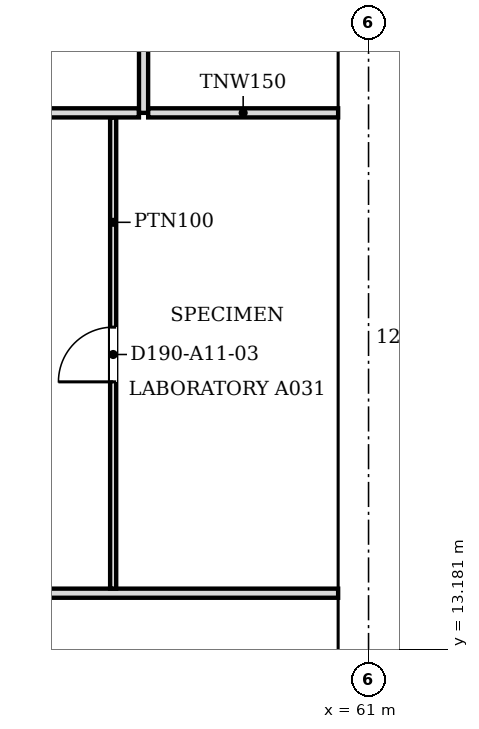
"""IFC4 building model, lengths in metres.
Left out: names, types, materials, properties, quantities, classifications, styles, units other than length and angle.
Written with IfcOpenShell. Run it as: python <this file> out.ifc"""

import sys

from ifc_helpers import new_model, si_unit, direction, frame, frame_2d, origin, place, context, subcontext, project, spatial, polyline, rectangle, outline, extrude, faceted_brep, source, transform, mapped, element, fill, save


model = new_model("IFC4")
c1 = context("Model", 3, precision=1e-05, world=origin(), true_north=direction((0.0, 1.0)))
c2 = subcontext(c1, "Body", "Model", "MODEL_VIEW")
j1 = project(units=[si_unit("LENGTHUNIT", "METRE"), si_unit("PLANEANGLEUNIT", "RADIAN")], contexts=[c1])
p1 = place(None, origin())
s1 = spatial("IfcSite", under=j1, at=p1, CompositionType="ELEMENT")
p2 = place(p1, origin())
s2 = spatial("IfcBuilding", under=s1, at=p2, CompositionType="ELEMENT")
p3 = place(p2, frame((0.0, 0.0, 131.6)))
s3 = spatial("IfcBuildingStorey", under=s2, at=p3, CompositionType="ELEMENT", Elevation=131.6)
m1 = source(origin(), c2, "Body", "SweptSolid", [
    extrude(outline(polyline([(3.05, 0.0), (6.1, 3.8), (3.05, 7.6), (0.0, 3.8), (3.05, 0.0)])), frame((0.0, 0.25, 0.0), z_axis=(0.0, -1.0, 0.0), x_axis=(1.0, 0.0, 0.0)), (0.0, 0.0, 1.0), 0.5),
])
p4 = place(p3, frame((60.75, 9.15, -3.8), z_axis=(0.0, 0.0, 1.0), x_axis=(0.0, 1.0, 0.0)))
e1 = element("IfcWall", 1, at=p4, inside=s3, PredefinedType="SOLIDWALL", context=c2, shape_type="MappedRepresentation", body=[
    mapped(m1, transform((0.0, 0.0, 0.0), scale=1.0)),
])
m2 = source(origin(), c2, "Body", "SweptSolid", [
    extrude(outline(polyline([(3.05, 0.399), (5.78, 3.8), (3.05, 7.2), (0.321, 3.8), (3.05, 0.399)])), frame((0.0, 0.26, 0.0), z_axis=(0.0, -1.0, 0.0), x_axis=(1.0, 0.0, 0.0)), (0.0, 0.0, 1.0), 0.52),
])
p5 = place(p4, origin())
e2 = element("IfcOpeningElement", 2, at=p5, cuts=e1, PredefinedType="OPENING", context=c2, shape_type="MappedRepresentation", body=[
    mapped(m2, transform((0.0, 0.0, 0.0), scale=1.0)),
])
p6 = place(p3, frame((60.75, 15.25, -3.8), z_axis=(0.0, 0.0, 1.0), x_axis=(0.0, 1.0, 0.0)))
e3 = element("IfcWall", 3, at=p6, inside=s3, PredefinedType="SOLIDWALL", context=c2, shape_type="MappedRepresentation", body=[
    mapped(m1, transform((0.0, 0.0, 0.0), scale=1.0)),
])
p7 = place(p6, origin())
e4 = element("IfcOpeningElement", 4, at=p7, cuts=e3, PredefinedType="OPENING", context=c2, shape_type="MappedRepresentation", body=[
    mapped(m2, transform((0.0, 0.0, 0.0), scale=1.0)),
])
m3 = source(origin(), c2, "Body", "Brep", [
    faceted_brep([(3.05, -0.25, 0.0), (6.1, -0.25, 3.8), (6.1, -0.25, 3.8), (3.05, -0.25, 7.6), (0.0, -0.25, 3.8), (0.0, 0.25, 3.8), (3.05, 0.25, 7.6), (6.1, 0.25, 3.8), (6.1, 0.25, 3.8), (3.05, 0.25, 0.0)], [[[0, 1, 2, 3, 4]], [[5, 6, 7, 8, 9]], [[9, 8, 1, 0]], [[7, 6, 3, 2]], [[6, 5, 4, 3]], [[5, 9, 0, 4]], [[1, 8, 7, 2]]]),
])
p8 = place(p3, frame((60.75, 21.35, -3.8), z_axis=(0.0, 0.0, 1.0), x_axis=(0.0, 1.0, 0.0)))
e5 = element("IfcWall", 5, at=p8, inside=s3, PredefinedType="SOLIDWALL", context=c2, shape_type="MappedRepresentation", body=[
    mapped(m3, transform((0.0, 0.0, 0.0), scale=1.0)),
])
p9 = place(p8, origin())
e6 = element("IfcOpeningElement", 6, at=p9, cuts=e5, PredefinedType="OPENING", context=c2, shape_type="MappedRepresentation", body=[
    mapped(m2, transform((0.0, 0.0, 0.0), scale=1.0)),
])
p10 = place(p2, frame((0.0, 0.0, 135.4)))
s4 = spatial("IfcBuildingStorey", under=s2, at=p10, CompositionType="ELEMENT", Elevation=135.4)
m4 = source(origin(), c2, "Body", "SweptSolid", [
    extrude(outline(polyline([(3.05, 0.0), (6.1, 3.8), (3.05, 7.6), (0.0, 3.8), (3.05, 0.0)])), frame((0.0, 0.25, 0.0), z_axis=(0.0, -1.0, 0.0), x_axis=(1.0, 0.0, 0.0)), (0.0, 0.0, 1.0), 0.5),
])
p11 = place(p10, frame((60.75, 12.2, -3.8), z_axis=(0.0, 0.0, 1.0), x_axis=(0.0, 1.0, 0.0)))
e7 = element("IfcWall", 7, at=p11, inside=s4, PredefinedType="SOLIDWALL", context=c2, shape_type="MappedRepresentation", body=[
    mapped(m4, transform((0.0, 0.0, 0.0), scale=1.0)),
])
m5 = source(origin(), c2, "Body", "SweptSolid", [
    extrude(outline(polyline([(3.05, 0.399), (5.78, 3.8), (3.05, 7.2), (0.321, 3.8), (3.05, 0.399)])), frame((0.0, 0.26, 0.0), z_axis=(0.0, -1.0, 0.0), x_axis=(1.0, 0.0, 0.0)), (0.0, 0.0, 1.0), 0.52),
])
p12 = place(p11, origin())
e8 = element("IfcOpeningElement", 8, at=p12, cuts=e7, PredefinedType="OPENING", context=c2, shape_type="MappedRepresentation", body=[
    mapped(m5, transform((0.0, 0.0, 0.0), scale=1.0)),
])
m6 = source(origin(), c2, "Body", "Brep", [
    faceted_brep([(3.05, -0.25, 0.0), (6.1, -0.25, 3.8), (6.1, -0.25, 3.8), (3.05, -0.25, 7.6), (0.0, -0.25, 3.8), (0.0, 0.25, 3.8), (3.05, 0.25, 7.6), (6.1, 0.25, 3.8), (6.1, 0.25, 3.8), (3.05, 0.25, 0.0)], [[[0, 1, 2, 3, 4]], [[5, 6, 7, 8, 9]], [[9, 8, 1, 0]], [[7, 6, 3, 2]], [[6, 5, 4, 3]], [[5, 9, 0, 4]], [[1, 8, 7, 2]]]),
])
p13 = place(p10, frame((60.75, 18.3, -3.8), z_axis=(0.0, 0.0, 1.0), x_axis=(0.0, 1.0, 0.0)))
e9 = element("IfcWall", 9, at=p13, inside=s4, PredefinedType="SOLIDWALL", context=c2, shape_type="MappedRepresentation", body=[
    mapped(m6, transform((0.0, 0.0, 0.0), scale=1.0)),
])
p14 = place(p13, origin())
e10 = element("IfcOpeningElement", 10, at=p14, cuts=e9, PredefinedType="OPENING", context=c2, shape_type="MappedRepresentation", body=[
    mapped(m5, transform((0.0, 0.0, 0.0), scale=1.0)),
])
p15 = place(p3, frame((49.426, 14.1, 0.0), z_axis=(0.0, 0.0, 1.0), x_axis=(1.0, 0.0, 0.0)))
e11 = element("IfcWall", 11, at=p15, inside=s3, PredefinedType="PARTITIONING", context=c2, shape_type="SweptSolid", body=[
    extrude(rectangle(XDim=11.074, YDim=0.15, at=frame_2d((5.537, 0.0))), origin(), (0.0, 0.0, 1.0), 3.067),
])
p16 = place(p3, frame((56.8, 21.924, 0.0), z_axis=(0.0, 0.0, 1.0), x_axis=(0.0, -1.0, 0.0)))
e12 = element("IfcWall", 12, at=p16, inside=s3, PredefinedType="PARTITIONING", context=c2, shape_type="SweptSolid", body=[
    extrude(rectangle(XDim=7.748, YDim=0.1, at=frame_2d((3.874, 0.0))), origin(), (0.0, 0.0, 1.0), 3.067),
])
m7 = source(origin(), c2, "Body", "SweptSolid", [
    extrude(rectangle(XDim=0.9, YDim=2.1, at=frame_2d((0.45, 1.05))), frame((0.0, 0.06, 0.0), z_axis=(0.0, -1.0, 0.0), x_axis=(1.0, 0.0, 0.0)), (0.0, 0.0, 1.0), 0.12),
])
p17 = place(p16, frame((3.448, 0.0, 0.0)))
e13 = element("IfcOpeningElement", 13, at=p17, cuts=e12, PredefinedType="OPENING", context=c2, shape_type="MappedRepresentation", body=[
    mapped(m7, transform((0.0, 0.0, 0.0), scale=1.0)),
])
p18 = place(p3, frame((45.476, 22.0, 0.0), z_axis=(0.0, 0.0, 1.0), x_axis=(1.0, 0.0, 0.0)))
e14 = element("IfcWall", 14, at=p18, inside=s3, PredefinedType="PARTITIONING", context=c2, shape_type="SweptSolid", body=[
    extrude(rectangle(XDim=11.748, YDim=0.15, at=frame_2d((5.874, 0.0))), origin(), (0.0, 0.0, 1.0), 3.067),
])
p19 = place(p3, frame((57.3, 30.6, 0.0), z_axis=(0.0, 0.0, 1.0), x_axis=(0.0, -1.0, 0.0)))
e15 = element("IfcWall", 15, at=p19, inside=s3, PredefinedType="PARTITIONING", context=c2, shape_type="SweptSolid", body=[
    extrude(rectangle(XDim=8.6, YDim=0.15, at=frame_2d((4.3, 0.0))), origin(), (0.0, 0.0, 1.0), 3.067),
])
m8 = source(origin(), c2, "Body", "SweptSolid", [
    extrude(rectangle(XDim=0.9, YDim=2.1, at=frame_2d((0.45, 1.05))), frame((0.0, 0.085, 0.0), z_axis=(0.0, -1.0, 0.0), x_axis=(1.0, 0.0, 0.0)), (0.0, 0.0, 1.0), 0.17),
])
p20 = place(p19, frame((3.9, 0.0, 0.0)))
e16 = element("IfcOpeningElement", 16, at=p20, cuts=e15, PredefinedType="OPENING", context=c2, shape_type="MappedRepresentation", body=[
    mapped(m8, transform((0.0, 0.0, 0.0), scale=1.0)),
])
p21 = place(p3, frame((57.376, 22.0, 0.0), z_axis=(0.0, 0.0, 1.0), x_axis=(1.0, 0.0, 0.0)))
e17 = element("IfcWall", 17, at=p21, inside=s3, PredefinedType="PARTITIONING", context=c2, shape_type="SweptSolid", body=[
    extrude(rectangle(XDim=3.124, YDim=0.15, at=frame_2d((1.562, 0.0))), origin(), (0.0, 0.0, 1.0), 3.067),
])
m9 = source(origin(), c2, "Body", "SweptSolid", [
    extrude(rectangle(XDim=0.9, YDim=2.1, at=frame_2d((0.45, 1.05))), frame((0.0, 0.025, 0.0), z_axis=(0.0, -1.0, 0.0), x_axis=(1.0, 0.0, 0.0)), (0.0, 0.0, 1.0), 0.05),
])
p22 = place(p17, origin())
e18 = element("IfcDoor", 18, at=p22, inside=s3, OperationType="SINGLE_SWING_RIGHT", PredefinedType="DOOR", context=c2, shape_type="MappedRepresentation", body=[
    mapped(m9, transform((0.0, 0.0, 0.0), scale=1.0)),
])
fill(e13, e18)
save(model, sys.argv[1])
